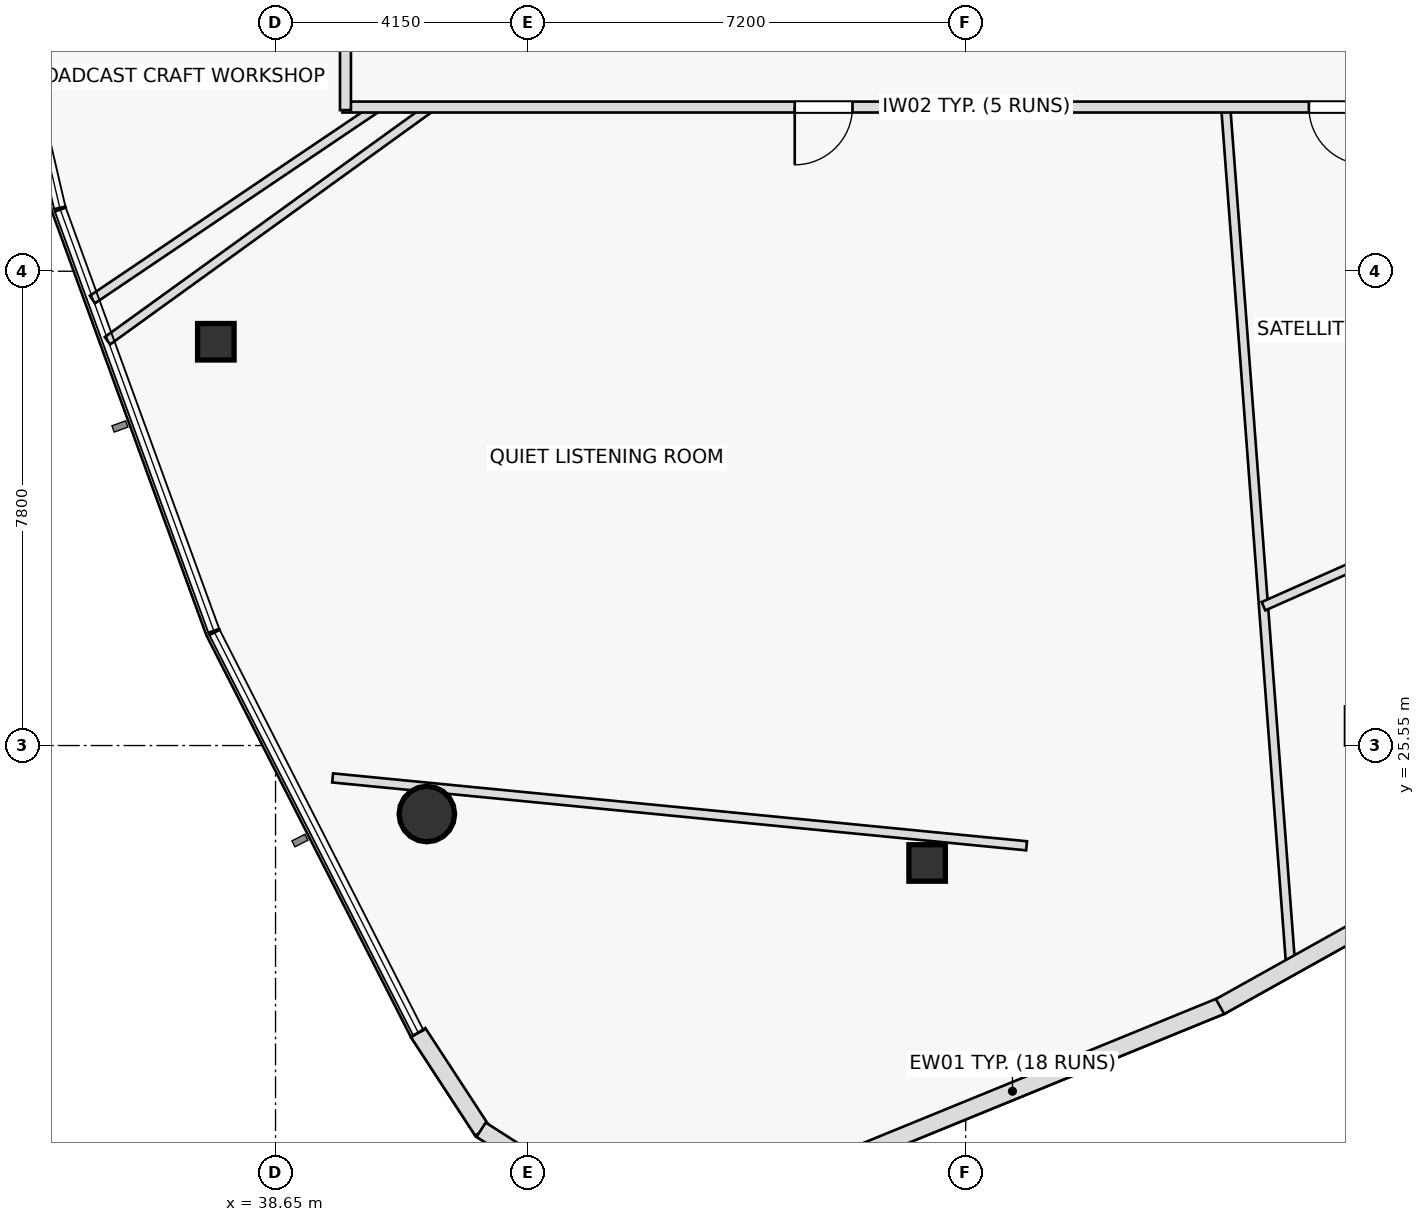
"""IFC4 building model, lengths in metres.
Left out: names, types, materials, properties, quantities, classifications, styles, units other than length and angle.
Written with IfcOpenShell. Run it as: python <this file> out.ifc"""

import sys

from ifc_helpers import new_model, si_unit, direction, frame, frame_2d, origin, origin_2d, place, context, subcontext, project, spatial, rectangle, hollow_rectangle, hollow_circle, extrude, element, fill, save


model = new_model("IFC4")
c1 = context("Model", 3, precision=1e-05, world=origin(), true_north=direction((0.0, 1.0)))
c2 = subcontext(c1, "Body", "Model", "MODEL_VIEW")
j1 = project(units=[si_unit("LENGTHUNIT", "METRE"), si_unit("PLANEANGLEUNIT", "RADIAN")], contexts=[c1])
p1 = place(None, origin())
s1 = spatial("IfcSite", under=j1, at=p1, CompositionType="ELEMENT")
p2 = place(p1, origin())
s2 = spatial("IfcBuilding", under=s1, at=p2, CompositionType="ELEMENT")
p3 = place(p2, frame((0.0, 0.0, 200.3)))
s3 = spatial("IfcBuildingStorey", under=s2, at=p3, CompositionType="ELEMENT", Elevation=200.3)
p4 = place(p3, frame((37.668, 32.19, 0.0), z_axis=(0.0, 0.0, 1.0), x_axis=(1.0, 0.0, 0.0)))
e1 = element("IfcColumn", 1, at=p4, inside=s3, PredefinedType="COLUMN", context=c2, shape_type="SweptSolid", body=[
    extrude(hollow_rectangle(XDim=0.6, YDim=0.6, WallThickness=0.036, at=origin_2d()), origin(), (0.0, 0.0, 1.0), 3.55),
])
p5 = place(p3, frame((41.139, 24.424, 0.0), z_axis=(0.0, 0.0, 1.0), x_axis=(1.0, 0.0, 0.0)))
e2 = element("IfcColumn", 2, at=p5, inside=s3, PredefinedType="COLUMN", context=c2, shape_type="SweptSolid", body=[
    extrude(hollow_circle(Radius=0.457, WallThickness=0.04, at=origin_2d()), origin(), (0.0, 0.0, 1.0), 3.55),
])
p6 = place(p3, frame((49.366, 23.619, 0.0), z_axis=(0.0, 0.0, 1.0), x_axis=(1.0, 0.0, 0.0)))
e3 = element("IfcColumn", 3, at=p6, inside=s3, PredefinedType="COLUMN", context=c2, shape_type="SweptSolid", body=[
    extrude(hollow_rectangle(XDim=0.6, YDim=0.6, WallThickness=0.036, at=origin_2d()), origin(), (0.0, 0.0, 1.0), 3.55),
])
p7 = place(p3, frame((39.589, 25.018, 0.0), z_axis=(0.0, 0.0, 1.0), x_axis=(0.99524905582, -0.097361783517, 0.0)))
e4 = element("IfcWall", 4, at=p7, inside=s3, PredefinedType="PARTITIONING", context=c2, shape_type="SweptSolid", body=[
    extrude(rectangle(XDim=11.467, YDim=0.15, at=frame_2d((5.733, 0.0))), origin(), (0.0, 0.0, 1.0), 2.935),
])
p8 = place(p3, frame((40.331, 36.05, 0.0), z_axis=(0.0, 0.0, 1.0), x_axis=(-0.829032137796, -0.559200960748, 0.0)))
e5 = element("IfcWall", 5, at=p8, inside=s3, PredefinedType="PARTITIONING", context=c2, shape_type="SweptSolid", body=[
    extrude(rectangle(XDim=5.66, YDim=0.15, at=frame_2d((2.83, 0.0))), origin(), (0.0, 0.0, 1.0), 3.025),
])
p9 = place(p3, frame((41.207, 36.05, 0.0), z_axis=(0.0, 0.0, 1.0), x_axis=(-0.810696880717, -0.585466111398, 0.0)))
e6 = element("IfcWall", 6, at=p9, inside=s3, PredefinedType="PARTITIONING", context=c2, shape_type="SweptSolid", body=[
    extrude(rectangle(XDim=6.564, YDim=0.15, at=frame_2d((3.282, 0.0))), origin(), (0.0, 0.0, 1.0), 2.935),
])
p10 = place(p3, frame((54.277, 36.05, 0.0), z_axis=(0.0, 0.0, 1.0), x_axis=(0.075441607512, -0.997150221309, 0.0)))
e7 = element("IfcWall", 7, at=p10, inside=s3, PredefinedType="PARTITIONING", context=c2, shape_type="SweptSolid", body=[
    extrude(rectangle(XDim=14.194, YDim=0.15, at=frame_2d((7.097, 0.0))), origin(), (0.0, 0.0, 1.0), 3.025),
])
p11 = place(p3, frame((54.898, 27.841, 0.0), z_axis=(0.0, 0.0, 1.0), x_axis=(0.91408542803, 0.405521676687, 0.0)))
e8 = element("IfcWall", 8, at=p11, inside=s3, PredefinedType="PARTITIONING", context=c2, shape_type="SweptSolid", body=[
    extrude(rectangle(XDim=6.281, YDim=0.15, at=frame_2d((3.141, 0.0))), origin(), (0.0, 0.0, 1.0), 2.935),
])
p12 = place(p11, frame((2.666, 0.0, 0.0)))
e9 = element("IfcOpeningElement", 9, at=p12, cuts=e8, PredefinedType="OPENING", context=c2, shape_type="SweptSolid", body=[
    extrude(rectangle(XDim=0.95, YDim=2.05, at=frame_2d((0.475, 1.025))), frame((0.0, 0.085, 0.0), z_axis=(0.0, -1.0, 0.0), x_axis=(1.0, 0.0, 0.0)), (0.0, 0.0, 1.0), 0.17),
])
p13 = place(p3, frame((59.4, 36.05, 0.0), z_axis=(0.0, 0.0, 1.0), x_axis=(-1.0, 0.0, 0.0)))
e10 = element("IfcWall", 10, at=p13, inside=s3, PredefinedType="PARTITIONING", context=c2, shape_type="SweptSolid", body=[
    extrude(rectangle(XDim=19.65, YDim=0.18, at=frame_2d((9.825, 0.0))), origin(), (0.0, 0.0, 1.0), 2.935),
])
p14 = place(p13, frame((2.805, 0.0, 0.0)))
e11 = element("IfcOpeningElement", 11, at=p14, cuts=e10, PredefinedType="OPENING", context=c2, shape_type="SweptSolid", body=[
    extrude(rectangle(XDim=0.95, YDim=2.05, at=frame_2d((0.475, 1.025))), frame((0.0, 0.1, 0.0), z_axis=(0.0, -1.0, 0.0), x_axis=(1.0, 0.0, 0.0)), (0.0, 0.0, 1.0), 0.2),
])
p15 = place(p13, frame((11.261, 0.0, 0.0)))
e12 = element("IfcOpeningElement", 12, at=p15, cuts=e10, PredefinedType="OPENING", context=c2, shape_type="SweptSolid", body=[
    extrude(rectangle(XDim=0.95, YDim=2.05, at=frame_2d((0.475, 1.025))), frame((0.0, 0.1, 0.0), z_axis=(0.0, -1.0, 0.0), x_axis=(1.0, 0.0, 0.0)), (0.0, 0.0, 1.0), 0.2),
])
p16 = place(p3, frame((39.8, 36.0, 0.0), z_axis=(0.0, 0.0, 1.0), x_axis=(0.0, 1.0, 0.0)))
e13 = element("IfcWall", 13, at=p16, inside=s3, PredefinedType="PARTITIONING", context=c2, shape_type="SweptSolid", body=[
    extrude(rectangle(XDim=4.25, YDim=0.18, at=frame_2d((2.125, 0.0))), origin(), (0.0, 0.0, 1.0), 2.935),
])
p17 = place(p16, frame((1.65, 0.0, 0.0)))
e14 = element("IfcOpeningElement", 14, at=p17, cuts=e13, PredefinedType="OPENING", context=c2, shape_type="SweptSolid", body=[
    extrude(rectangle(XDim=0.95, YDim=2.05, at=frame_2d((0.475, 1.025))), frame((0.0, 0.1, 0.0), z_axis=(0.0, -1.0, 0.0), x_axis=(1.0, 0.0, 0.0)), (0.0, 0.0, 1.0), 0.2),
])
p18 = place(p3, frame((40.996, 20.828, 0.0), z_axis=(0.0, 0.0, 1.0), x_axis=(0.54679613753, -0.837265778581, 0.0)))
e15 = element("IfcWall", 15, at=p18, inside=s3, PredefinedType="STANDARD", context=c2, shape_type="SweptSolid", body=[
    extrude(rectangle(XDim=1.931, YDim=0.28, at=frame_2d((0.965, 0.0))), origin(), (0.0, 0.0, 1.0), 3.55),
])
p19 = place(p3, frame((42.031, 19.232, 0.0), z_axis=(0.0, 0.0, 1.0), x_axis=(0.842943077686, -0.538002758155, 0.0)))
e16 = element("IfcWall", 16, at=p19, inside=s3, PredefinedType="STANDARD", context=c2, shape_type="SweptSolid", body=[
    extrude(rectangle(XDim=1.919, YDim=0.28, at=frame_2d((0.959, 0.0))), origin(), (0.0, 0.0, 1.0), 3.55),
])
p20 = place(p3, frame((47.329, 18.459, 0.0), z_axis=(0.0, 0.0, 1.0), x_axis=(0.925715323492, 0.378221019844, 0.0)))
e17 = element("IfcWall", 17, at=p20, inside=s3, PredefinedType="STANDARD", context=c2, shape_type="SweptSolid", body=[
    extrude(rectangle(XDim=7.434, YDim=0.28, at=frame_2d((3.717, 0.0))), origin(), (0.0, 0.0, 1.0), 3.55),
])
p21 = place(p3, frame((54.183, 21.258, 0.0), z_axis=(0.0, 0.0, 1.0), x_axis=(0.873143651133, 0.487462987811, 0.0)))
e18 = element("IfcWall", 18, at=p21, inside=s3, PredefinedType="STANDARD", context=c2, shape_type="SweptSolid", body=[
    extrude(rectangle(XDim=7.421, YDim=0.28, at=frame_2d((3.711, 0.0))), origin(), (0.0, 0.0, 1.0), 3.55),
])
p22 = place(p14, origin())
e19 = element("IfcDoor", 19, at=p22, inside=s3, OperationType="SINGLE_SWING_LEFT", PredefinedType="DOOR", context=c2, shape_type="SweptSolid", body=[
    extrude(rectangle(XDim=0.95, YDim=2.05, at=frame_2d((0.475, 1.025))), frame((0.0, 0.025, 0.0), z_axis=(0.0, -1.0, 0.0), x_axis=(1.0, 0.0, 0.0)), (0.0, 0.0, 1.0), 0.05),
])
fill(e11, e19)
p23 = place(p15, origin())
e20 = element("IfcDoor", 20, at=p23, inside=s3, OperationType="SINGLE_SWING_RIGHT", PredefinedType="DOOR", context=c2, shape_type="SweptSolid", body=[
    extrude(rectangle(XDim=0.95, YDim=2.05, at=frame_2d((0.475, 1.025))), frame((0.0, 0.025, 0.0), z_axis=(0.0, -1.0, 0.0), x_axis=(1.0, 0.0, 0.0)), (0.0, 0.0, 1.0), 0.05),
])
fill(e12, e20)
save(model, sys.argv[1])
